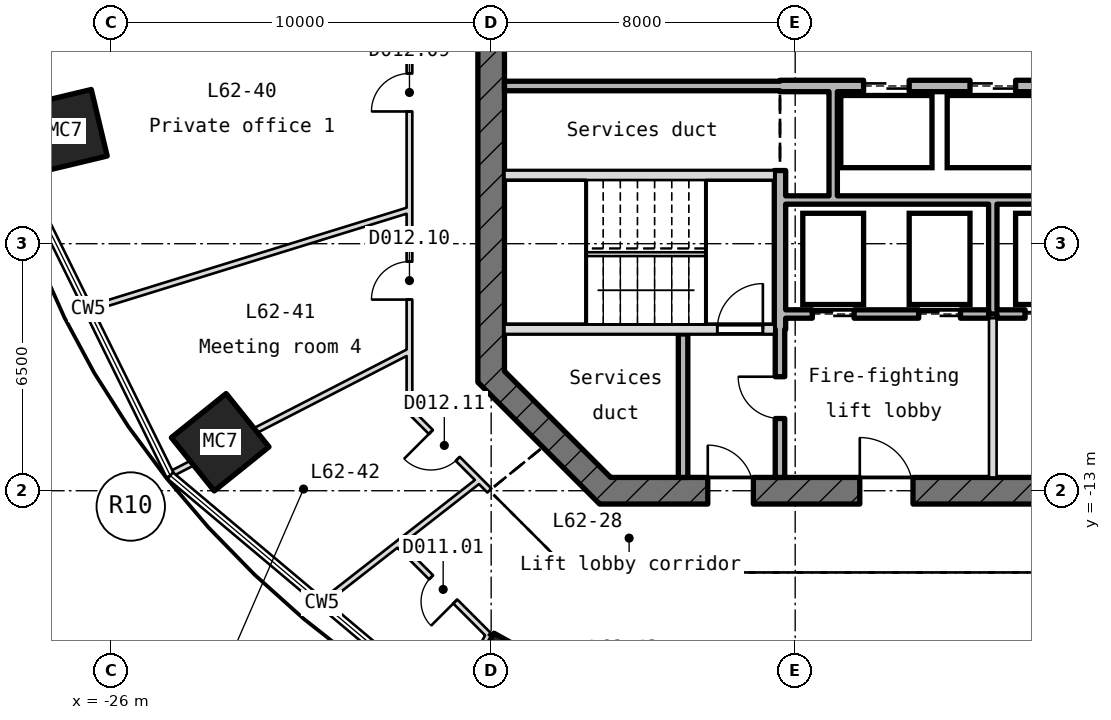
"""IFC4 building model, lengths in metres.
Left out: names, types, materials, properties, quantities, classifications, styles, units other than length and angle.
Written with IfcOpenShell. Run it as: python <this file> out.ifc"""

import sys

from ifc_helpers import new_model, si_unit, direction, frame, frame_2d, origin, origin_2d, place, context, subcontext, project, spatial, rectangle, hollow_rectangle, extrude, element, fill, save


model = new_model("IFC4")
c1 = context("Model", 3, precision=1e-05, world=origin(), true_north=direction((0.0, 1.0)))
c2 = subcontext(c1, "Body", "Model", "MODEL_VIEW")
j1 = project(units=[si_unit("LENGTHUNIT", "METRE"), si_unit("PLANEANGLEUNIT", "RADIAN")], contexts=[c1])
p1 = place(None, origin())
s1 = spatial("IfcSite", under=j1, at=p1, CompositionType="ELEMENT")
p2 = place(p1, origin())
s2 = spatial("IfcBuilding", under=s1, at=p2, CompositionType="ELEMENT")
p3 = place(p2, frame((0.0, 0.0, 279.1)))
s3 = spatial("IfcBuildingStorey", under=s2, at=p3, CompositionType="ELEMENT", Elevation=279.1)
for number, where, z_axis, x_axis in (
    (1, (-27.213, -3.533, -0.25), (0.0, 0.0, 1.0), (-0.233, 0.973, 0.0)),
    (2, (-23.131, -11.724, -0.25), (0.0, 0.0, 1.0), (-0.627, 0.779, 0.0)),
    (3, (-15.588, -17.993, -0.25), (0.0, 0.0, 1.0), (-0.874, 0.486, 0.0)),
):
    element("IfcColumn", number, at=place(p3, frame(where, z_axis=z_axis, x_axis=x_axis)), inside=s3, PredefinedType="COLUMN", context=c2, shape_type="SweptSolid", body=[
        extrude(hollow_rectangle(XDim=1.8, YDim=1.85, WallThickness=0.06, at=origin_2d()), origin(), (0.0, 0.0, 1.0), 5.47),
    ])
p4 = place(p3, frame((-16.0, 10.145, -0.25), z_axis=(0.0, 0.0, 1.0), x_axis=(0.0, -1.0, 0.0)))
e4 = element("IfcWall", 4, at=p4, inside=s3, PredefinedType="SHEAR", context=c2, shape_type="SweptSolid", body=[
    extrude(rectangle(XDim=20.29, YDim=0.7, at=frame_2d((10.145, 0.0))), origin(), (0.0, 0.0, 1.0), 5.47),
])
p5 = place(p4, frame((8.945, 0.0, 0.25)))
e5 = element("IfcOpeningElement", 5, at=p5, cuts=e4, PredefinedType="OPENING", context=c2, shape_type="SweptSolid", body=[
    extrude(rectangle(XDim=2.4, YDim=2.1, at=frame_2d((1.2, 1.05))), frame((0.0, 0.36, 0.0), z_axis=(0.0, -1.0, 0.0), x_axis=(1.0, 0.0, 0.0)), (0.0, 0.0, 1.0), 0.72),
])
p6 = place(p4, frame((5.545, 0.0, 0.25)))
e6 = element("IfcOpeningElement", 6, at=p6, cuts=e4, PredefinedType="OPENING", context=c2, shape_type="SweptSolid", body=[
    extrude(rectangle(XDim=1.2, YDim=2.1, at=frame_2d((0.6, 1.05))), frame((0.0, 0.36, 0.0), z_axis=(0.0, -1.0, 0.0), x_axis=(1.0, 0.0, 0.0)), (0.0, 0.0, 1.0), 0.72),
])
p7 = place(p3, frame((-16.103, -9.897, -0.25), z_axis=(0.0, 0.0, 1.0), x_axis=(0.707106781187, -0.707106781187, 0.0)))
e7 = element("IfcWall", 7, at=p7, inside=s3, PredefinedType="SHEAR", context=c2, shape_type="SweptSolid", body=[
    extrude(rectangle(XDim=4.533, YDim=0.7, at=frame_2d((2.266, 0.0))), origin(), (0.0, 0.0, 1.0), 5.47),
])
p8 = place(p3, frame((-13.145, -13.0, -0.25), z_axis=(0.0, 0.0, 1.0), x_axis=(1.0, 0.0, 0.0)))
e8 = element("IfcWall", 8, at=p8, inside=s3, PredefinedType="SHEAR", context=c2, shape_type="SweptSolid", body=[
    extrude(rectangle(XDim=26.29, YDim=0.7, at=frame_2d((13.145, 0.0))), origin(), (0.0, 0.0, 1.0), 5.47),
])
p9 = place(p8, frame((2.845, 0.0, 0.25)))
e9 = element("IfcOpeningElement", 9, at=p9, cuts=e8, PredefinedType="OPENING", context=c2, shape_type="SweptSolid", body=[
    extrude(rectangle(XDim=1.2, YDim=2.1, at=frame_2d((0.6, 1.05))), frame((0.0, 0.36, 0.0), z_axis=(0.0, -1.0, 0.0), x_axis=(1.0, 0.0, 0.0)), (0.0, 0.0, 1.0), 0.72),
])
p10 = place(p8, frame((6.845, 0.0, 0.25)))
e10 = element("IfcOpeningElement", 10, at=p10, cuts=e8, PredefinedType="OPENING", context=c2, shape_type="SweptSolid", body=[
    extrude(rectangle(XDim=1.4, YDim=2.1, at=frame_2d((0.7, 1.05))), frame((0.0, 0.36, 0.0), z_axis=(0.0, -1.0, 0.0), x_axis=(1.0, 0.0, 0.0)), (0.0, 0.0, 1.0), 0.72),
])
p11 = place(p8, frame((15.445, 0.0, 0.25)))
e11 = element("IfcOpeningElement", 11, at=p11, cuts=e8, PredefinedType="OPENING", context=c2, shape_type="SweptSolid", body=[
    extrude(rectangle(XDim=1.4, YDim=2.1, at=frame_2d((0.7, 1.05))), frame((0.0, 0.36, 0.0), z_axis=(0.0, -1.0, 0.0), x_axis=(1.0, 0.0, 0.0)), (0.0, 0.0, 1.0), 0.72),
])
p12 = place(p3, frame((-15.65, -8.75, -0.25), z_axis=(0.0, 0.0, 1.0), x_axis=(1.0, 0.0, 0.0)))
e12 = element("IfcWall", 12, at=p12, inside=s3, PredefinedType="SHEAR", context=c2, shape_type="SweptSolid", body=[
    extrude(rectangle(XDim=7.1, YDim=0.25, at=frame_2d((3.55, 0.0))), origin(), (0.0, 0.0, 1.0), 5.47),
])
p13 = place(p12, frame((5.6, 0.0, 0.25)))
e13 = element("IfcOpeningElement", 13, at=p13, cuts=e12, PredefinedType="OPENING", context=c2, shape_type="SweptSolid", body=[
    extrude(rectangle(XDim=1.2, YDim=2.1, at=frame_2d((0.6, 1.05))), frame((0.0, 0.135, 0.0), z_axis=(0.0, -1.0, 0.0), x_axis=(1.0, 0.0, 0.0)), (0.0, 0.0, 1.0), 0.27),
])
p14 = place(p3, frame((-8.25, -8.35, 0.0), z_axis=(0.0, 0.0, 1.0), x_axis=(1.0, 0.0, 0.0)))
e14 = element("IfcWall", 14, at=p14, inside=s3, PredefinedType="STANDARD", context=c2, shape_type="SweptSolid", body=[
    extrude(rectangle(XDim=5.34, YDim=0.22, at=frame_2d((2.67, 0.0))), origin(), (0.0, 0.0, 1.0), 5.22),
])
p15 = place(p14, frame((0.7, 0.0, 0.0)))
e15 = element("IfcOpeningElement", 15, at=p15, cuts=e14, PredefinedType="OPENING", context=c2, shape_type="SweptSolid", body=[
    extrude(rectangle(XDim=1.1, YDim=2.1, at=frame_2d((0.55, 1.05))), frame((0.0, 0.12, 0.0), z_axis=(0.0, -1.0, 0.0), x_axis=(1.0, 0.0, 0.0)), (0.0, 0.0, 1.0), 0.24),
])
p16 = place(p14, frame((3.5, 0.0, 0.0)))
e16 = element("IfcOpeningElement", 16, at=p16, cuts=e14, PredefinedType="OPENING", context=c2, shape_type="SweptSolid", body=[
    extrude(rectangle(XDim=1.1, YDim=2.1, at=frame_2d((0.55, 1.05))), frame((0.0, 0.12, 0.0), z_axis=(0.0, -1.0, 0.0), x_axis=(1.0, 0.0, 0.0)), (0.0, 0.0, 1.0), 0.24),
])
p17 = place(p3, frame((-2.69, -8.35, 0.0), z_axis=(0.0, 0.0, 1.0), x_axis=(1.0, 0.0, 0.0)))
e17 = element("IfcWall", 17, at=p17, inside=s3, PredefinedType="STANDARD", context=c2, shape_type="SweptSolid", body=[
    extrude(rectangle(XDim=10.94, YDim=0.22, at=frame_2d((5.47, 0.0))), origin(), (0.0, 0.0, 1.0), 5.22),
])
p18 = place(p17, frame((0.74, 0.0, 0.0)))
e18 = element("IfcOpeningElement", 18, at=p18, cuts=e17, PredefinedType="OPENING", context=c2, shape_type="SweptSolid", body=[
    extrude(rectangle(XDim=1.1, YDim=2.1, at=frame_2d((0.55, 1.05))), frame((0.0, 0.12, 0.0), z_axis=(0.0, -1.0, 0.0), x_axis=(1.0, 0.0, 0.0)), (0.0, 0.0, 1.0), 0.24),
])
p19 = place(p17, frame((3.54, 0.0, 0.0)))
e19 = element("IfcOpeningElement", 19, at=p19, cuts=e17, PredefinedType="OPENING", context=c2, shape_type="SweptSolid", body=[
    extrude(rectangle(XDim=1.1, YDim=2.1, at=frame_2d((0.55, 1.05))), frame((0.0, 0.12, 0.0), z_axis=(0.0, -1.0, 0.0), x_axis=(1.0, 0.0, 0.0)), (0.0, 0.0, 1.0), 0.24),
])
p20 = place(p3, frame((-8.25, -5.35, 0.0), z_axis=(0.0, 0.0, 1.0), x_axis=(1.0, 0.0, 0.0)))
e20 = element("IfcWall", 20, at=p20, inside=s3, PredefinedType="STANDARD", context=c2, shape_type="SweptSolid", body=[
    extrude(rectangle(XDim=16.5, YDim=0.22, at=frame_2d((8.25, 0.0))), origin(), (0.0, 0.0, 1.0), 5.22),
])
p21 = place(p3, frame((-15.65, -4.7, -0.25), z_axis=(0.0, 0.0, 1.0), x_axis=(1.0, 0.0, 0.0)))
e21 = element("IfcWall", 21, at=p21, inside=s3, PredefinedType="SHEAR", context=c2, shape_type="SweptSolid", body=[
    extrude(rectangle(XDim=7.1, YDim=0.25, at=frame_2d((3.55, 0.0))), origin(), (0.0, 0.0, 1.0), 5.47),
])
p22 = place(p3, frame((-15.65, -2.35, 0.0), z_axis=(0.0, 0.0, 1.0), x_axis=(1.0, 0.0, 0.0)))
e22 = element("IfcWall", 22, at=p22, inside=s3, PredefinedType="STANDARD", context=c2, shape_type="SweptSolid", body=[
    extrude(rectangle(XDim=7.25, YDim=0.25, at=frame_2d((3.625, 0.0))), origin(), (0.0, 0.0, 1.0), 5.22),
])
p23 = place(p3, frame((-8.4, -2.35, -0.25), z_axis=(0.0, 0.0, 1.0), x_axis=(1.0, 0.0, 0.0)))
e23 = element("IfcWall", 23, at=p23, inside=s3, PredefinedType="SHEAR", context=c2, shape_type="SweptSolid", body=[
    extrude(rectangle(XDim=16.8, YDim=0.3, at=frame_2d((8.4, 0.0))), origin(), (0.0, 0.0, 1.0), 5.47),
])
p24 = place(p23, frame((2.2, 0.0, 0.25)))
e24 = element("IfcOpeningElement", 24, at=p24, cuts=e23, PredefinedType="OPENING", context=c2, shape_type="SweptSolid", body=[
    extrude(rectangle(XDim=1.2, YDim=2.1, at=frame_2d((0.6, 1.05))), frame((0.0, 0.16, 0.0), z_axis=(0.0, -1.0, 0.0), x_axis=(1.0, 0.0, 0.0)), (0.0, 0.0, 1.0), 0.32),
])
p25 = place(p23, frame((5.0, 0.0, 0.25)))
e25 = element("IfcOpeningElement", 25, at=p25, cuts=e23, PredefinedType="OPENING", context=c2, shape_type="SweptSolid", body=[
    extrude(rectangle(XDim=1.2, YDim=2.1, at=frame_2d((0.6, 1.05))), frame((0.0, 0.16, 0.0), z_axis=(0.0, -1.0, 0.0), x_axis=(1.0, 0.0, 0.0)), (0.0, 0.0, 1.0), 0.32),
])
p26 = place(p23, frame((7.8, 0.0, 0.25)))
e26 = element("IfcOpeningElement", 26, at=p26, cuts=e23, PredefinedType="OPENING", context=c2, shape_type="SweptSolid", body=[
    extrude(rectangle(XDim=1.2, YDim=2.1, at=frame_2d((0.6, 1.05))), frame((0.0, 0.16, 0.0), z_axis=(0.0, -1.0, 0.0), x_axis=(1.0, 0.0, 0.0)), (0.0, 0.0, 1.0), 0.32),
])
p27 = place(p23, frame((10.6, 0.0, 0.25)))
e27 = element("IfcOpeningElement", 27, at=p27, cuts=e23, PredefinedType="OPENING", context=c2, shape_type="SweptSolid", body=[
    extrude(rectangle(XDim=1.2, YDim=2.1, at=frame_2d((0.6, 1.05))), frame((0.0, 0.16, 0.0), z_axis=(0.0, -1.0, 0.0), x_axis=(1.0, 0.0, 0.0)), (0.0, 0.0, 1.0), 0.32),
])
p28 = place(p23, frame((13.4, 0.0, 0.25)))
e28 = element("IfcOpeningElement", 28, at=p28, cuts=e23, PredefinedType="OPENING", context=c2, shape_type="SweptSolid", body=[
    extrude(rectangle(XDim=1.2, YDim=2.1, at=frame_2d((0.6, 1.05))), frame((0.0, 0.16, 0.0), z_axis=(0.0, -1.0, 0.0), x_axis=(1.0, 0.0, 0.0)), (0.0, 0.0, 1.0), 0.32),
])
p29 = place(p3, frame((-10.95, -12.65, 0.0), z_axis=(0.0, 0.0, 1.0), x_axis=(0.0, 1.0, 0.0)))
e29 = element("IfcWall", 29, at=p29, inside=s3, PredefinedType="STANDARD", context=c2, shape_type="SweptSolid", body=[
    extrude(rectangle(XDim=3.775, YDim=0.25, at=frame_2d((1.887, 0.0))), origin(), (0.0, 0.0, 1.0), 5.22),
])
p30 = place(p3, frame((-8.4, -12.65, 0.0), z_axis=(0.0, 0.0, 1.0), x_axis=(0.0, 1.0, 0.0)))
e30 = element("IfcWall", 30, at=p30, inside=s3, PredefinedType="STANDARD", context=c2, shape_type="SweptSolid", body=[
    extrude(rectangle(XDim=3.9, YDim=0.25, at=frame_2d((1.95, 0.0))), origin(), (0.0, 0.0, 1.0), 5.22),
])
p31 = place(p30, frame((1.55, 0.0, 0.0)))
e31 = element("IfcOpeningElement", 31, at=p31, cuts=e30, PredefinedType="OPENING", context=c2, shape_type="SweptSolid", body=[
    extrude(rectangle(XDim=1.1, YDim=2.1, at=frame_2d((0.55, 1.05))), frame((0.0, 0.135, 0.0), z_axis=(0.0, -1.0, 0.0), x_axis=(1.0, 0.0, 0.0)), (0.0, 0.0, 1.0), 0.27),
])
p32 = place(p3, frame((-8.4, -8.75, -0.25), z_axis=(0.0, 0.0, 1.0), x_axis=(0.0, 1.0, 0.0)))
e32 = element("IfcWall", 32, at=p32, inside=s3, PredefinedType="SHEAR", context=c2, shape_type="SweptSolid", body=[
    extrude(rectangle(XDim=4.175, YDim=0.3, at=frame_2d((2.087, 0.0))), origin(), (0.0, 0.0, 1.0), 5.47),
])
p33 = place(p3, frame((-7.0, -5.24, 0.0), z_axis=(0.0, 0.0, 1.0), x_axis=(0.0, 1.0, 0.0)))
e33 = element("IfcWall", 33, at=p33, inside=s3, PredefinedType="STANDARD", context=c2, shape_type="SweptSolid", body=[
    extrude(rectangle(XDim=2.74, YDim=0.22, at=frame_2d((1.37, 0.0))), origin(), (0.0, 0.0, 1.0), 5.22),
])
p34 = place(p3, frame((-2.8, -12.65, 0.0), z_axis=(0.0, 0.0, 1.0), x_axis=(0.0, 1.0, 0.0)))
e34 = element("IfcWall", 34, at=p34, inside=s3, PredefinedType="PARTITIONING", context=c2, shape_type="SweptSolid", body=[
    extrude(rectangle(XDim=4.19, YDim=0.2, at=frame_2d((2.095, 0.0))), origin(), (0.0, 0.0, 1.0), 5.22),
])
p35 = place(p3, frame((-2.8, -8.35, 0.0), z_axis=(0.0, 0.0, 1.0), x_axis=(0.0, 1.0, 0.0)))
e35 = element("IfcWall", 35, at=p35, inside=s3, PredefinedType="STANDARD", context=c2, shape_type="SweptSolid", body=[
    extrude(rectangle(XDim=2.89, YDim=0.22, at=frame_2d((1.445, 0.0))), origin(), (0.0, 0.0, 1.0), 5.22),
])
p36 = place(p3, frame((-26.584, -8.216, 0.0), z_axis=(0.0, 0.0, 1.0), x_axis=(0.955409308592, 0.29528469831, 0.0)))
e36 = element("IfcWall", 36, at=p36, inside=s3, PredefinedType="PARTITIONING", context=c2, shape_type="SweptSolid", body=[
    extrude(rectangle(XDim=8.828, YDim=0.15, at=frame_2d((4.414, 0.0))), origin(), (0.0, 0.0, 1.0), 5.22),
])
p37 = place(p3, frame((-24.44, -12.566, 0.0), z_axis=(0.0, 0.0, 1.0), x_axis=(0.889344754937, 0.45723725446, 0.0)))
e37 = element("IfcWall", 37, at=p37, inside=s3, PredefinedType="PARTITIONING", context=c2, shape_type="SweptSolid", body=[
    extrude(rectangle(XDim=7.073, YDim=0.15, at=frame_2d((3.536, 0.0))), origin(), (0.0, 0.0, 1.0), 5.22),
])
p38 = place(p3, frame((-18.46, -14.399, 0.0), z_axis=(0.0, 0.0, 1.0), x_axis=(0.788462265821, 0.615083128834, 0.0)))
e38 = element("IfcWall", 38, at=p38, inside=s3, PredefinedType="PARTITIONING", context=c2, shape_type="SweptSolid", body=[
    extrude(rectangle(XDim=2.72, YDim=0.15, at=frame_2d((1.36, 0.0))), origin(), (0.0, 0.0, 1.0), 5.22),
])
p39 = place(p3, frame((-18.15, -10.891, 0.0), z_axis=(0.0, 0.0, 1.0), x_axis=(0.0, 1.0, 0.0)))
e39 = element("IfcWall", 39, at=p39, inside=s3, PredefinedType="PARTITIONING", context=c2, shape_type="SweptSolid", body=[
    extrude(rectangle(XDim=21.614, YDim=0.15, at=frame_2d((10.807, 0.0))), origin(), (0.0, 0.0, 1.0), 5.22),
])
p40 = place(p39, frame((14.093, 0.0, 0.0)))
e40 = element("IfcOpeningElement", 40, at=p40, cuts=e39, PredefinedType="OPENING", context=c2, shape_type="SweptSolid", body=[
    extrude(rectangle(XDim=1.0, YDim=2.1, at=frame_2d((0.5, 1.05))), frame((0.0, 0.085, 0.0), z_axis=(0.0, -1.0, 0.0), x_axis=(1.0, 0.0, 0.0)), (0.0, 0.0, 1.0), 0.17),
])
p41 = place(p39, frame((7.87, 0.0, 0.0)))
e41 = element("IfcOpeningElement", 41, at=p41, cuts=e39, PredefinedType="OPENING", context=c2, shape_type="SweptSolid", body=[
    extrude(rectangle(XDim=1.0, YDim=2.1, at=frame_2d((0.5, 1.05))), frame((0.0, 0.085, 0.0), z_axis=(0.0, -1.0, 0.0), x_axis=(1.0, 0.0, 0.0)), (0.0, 0.0, 1.0), 0.17),
])
p42 = place(p39, frame((2.92, 0.0, 0.0)))
e42 = element("IfcOpeningElement", 42, at=p42, cuts=e39, PredefinedType="OPENING", context=c2, shape_type="SweptSolid", body=[
    extrude(rectangle(XDim=1.0, YDim=2.1, at=frame_2d((0.5, 1.05))), frame((0.0, 0.085, 0.0), z_axis=(0.0, -1.0, 0.0), x_axis=(1.0, 0.0, 0.0)), (0.0, 0.0, 1.0), 0.17),
])
p43 = place(p3, frame((-16.046, -12.994, 0.0), z_axis=(0.0, 0.0, 1.0), x_axis=(-0.707106781187, 0.707106781187, 0.0)))
e43 = element("IfcWall", 43, at=p43, inside=s3, PredefinedType="PARTITIONING", context=c2, shape_type="SweptSolid", body=[
    extrude(rectangle(XDim=2.975, YDim=0.15, at=frame_2d((1.487, 0.0))), origin(), (0.0, 0.0, 1.0), 5.22),
])
p44 = place(p43, frame((1.177, 0.0, 0.0)))
e44 = element("IfcOpeningElement", 44, at=p44, cuts=e43, PredefinedType="OPENING", context=c2, shape_type="SweptSolid", body=[
    extrude(rectangle(XDim=1.0, YDim=2.1, at=frame_2d((0.5, 1.05))), frame((0.0, 0.085, 0.0), z_axis=(0.0, -1.0, 0.0), x_axis=(1.0, 0.0, 0.0)), (0.0, 0.0, 1.0), 0.17),
])
p45 = place(p3, frame((-20.439, -15.942, 0.0), z_axis=(0.0, 0.0, 1.0), x_axis=(0.788556920003, 0.614961774353, 0.0)))
e45 = element("IfcWall", 45, at=p45, inside=s3, PredefinedType="PARTITIONING", context=c2, shape_type="SweptSolid", body=[
    extrude(rectangle(XDim=2.515, YDim=0.15, at=frame_2d((1.257, 0.0))), origin(), (0.0, 0.0, 1.0), 5.22),
])
p46 = place(p3, frame((-16.96, -18.404, 0.0), z_axis=(0.0, 0.0, 1.0), x_axis=(0.48554166506, 0.874213527401, 0.0)))
e46 = element("IfcWall", 46, at=p46, inside=s3, PredefinedType="PARTITIONING", context=c2, shape_type="SweptSolid", body=[
    extrude(rectangle(XDim=1.842, YDim=0.15, at=frame_2d((0.921, 0.0))), origin(), (0.0, 0.0, 1.0), 5.22),
])
p47 = place(p3, frame((-16.066, -16.793, 0.0), z_axis=(0.0, 0.0, 1.0), x_axis=(-0.707070734655, 0.70714282588, 0.0)))
e47 = element("IfcWall", 47, at=p47, inside=s3, PredefinedType="PARTITIONING", context=c2, shape_type="SweptSolid", body=[
    extrude(rectangle(XDim=3.386, YDim=0.15, at=frame_2d((1.693, 0.0))), origin(), (0.0, 0.0, 1.0), 5.22),
])
p48 = place(p47, frame((1.243, 0.0, 0.0)))
e48 = element("IfcOpeningElement", 48, at=p48, cuts=e47, PredefinedType="OPENING", context=c2, shape_type="SweptSolid", body=[
    extrude(rectangle(XDim=0.9, YDim=2.1, at=frame_2d((0.45, 1.05))), frame((0.0, 0.085, 0.0), z_axis=(0.0, -1.0, 0.0), x_axis=(1.0, 0.0, 0.0)), (0.0, 0.0, 1.0), 0.17),
])
p49 = place(p24, origin())
e49 = element("IfcDoor", 49, at=p49, inside=s3, OperationType="DOUBLE_DOOR_SLIDING", PredefinedType="DOOR", context=c2, shape_type="SweptSolid", body=[
    extrude(rectangle(XDim=1.2, YDim=2.1, at=frame_2d((0.6, 1.05))), frame((0.0, 0.025, 0.0), z_axis=(0.0, -1.0, 0.0), x_axis=(1.0, 0.0, 0.0)), (0.0, 0.0, 1.0), 0.05),
])
fill(e24, e49)
p50 = place(p25, origin())
e50 = element("IfcDoor", 50, at=p50, inside=s3, OperationType="DOUBLE_DOOR_SLIDING", PredefinedType="DOOR", context=c2, shape_type="SweptSolid", body=[
    extrude(rectangle(XDim=1.2, YDim=2.1, at=frame_2d((0.6, 1.05))), frame((0.0, 0.025, 0.0), z_axis=(0.0, -1.0, 0.0), x_axis=(1.0, 0.0, 0.0)), (0.0, 0.0, 1.0), 0.05),
])
fill(e25, e50)
p51 = place(p15, origin())
e51 = element("IfcDoor", 51, at=p51, inside=s3, OperationType="DOUBLE_DOOR_SLIDING", PredefinedType="DOOR", context=c2, shape_type="SweptSolid", body=[
    extrude(rectangle(XDim=1.1, YDim=2.1, at=frame_2d((0.55, 1.05))), frame((0.0, 0.025, 0.0), z_axis=(0.0, -1.0, 0.0), x_axis=(1.0, 0.0, 0.0)), (0.0, 0.0, 1.0), 0.05),
])
fill(e15, e51)
p52 = place(p16, origin())
e52 = element("IfcDoor", 52, at=p52, inside=s3, OperationType="DOUBLE_DOOR_SLIDING", PredefinedType="DOOR", context=c2, shape_type="SweptSolid", body=[
    extrude(rectangle(XDim=1.1, YDim=2.1, at=frame_2d((0.55, 1.05))), frame((0.0, 0.025, 0.0), z_axis=(0.0, -1.0, 0.0), x_axis=(1.0, 0.0, 0.0)), (0.0, 0.0, 1.0), 0.05),
])
fill(e16, e52)
p53 = place(p18, origin())
e53 = element("IfcDoor", 53, at=p53, inside=s3, OperationType="DOUBLE_DOOR_SLIDING", PredefinedType="DOOR", context=c2, shape_type="SweptSolid", body=[
    extrude(rectangle(XDim=1.1, YDim=2.1, at=frame_2d((0.55, 1.05))), frame((0.0, 0.025, 0.0), z_axis=(0.0, -1.0, 0.0), x_axis=(1.0, 0.0, 0.0)), (0.0, 0.0, 1.0), 0.05),
])
fill(e18, e53)
p54 = place(p13, origin())
e54 = element("IfcDoor", 54, at=p54, inside=s3, OperationType="SINGLE_SWING_RIGHT", PredefinedType="DOOR", context=c2, shape_type="SweptSolid", body=[
    extrude(rectangle(XDim=1.2, YDim=2.1, at=frame_2d((0.6, 1.05))), frame((0.0, 0.025, 0.0), z_axis=(0.0, -1.0, 0.0), x_axis=(1.0, 0.0, 0.0)), (0.0, 0.0, 1.0), 0.05),
])
fill(e13, e54)
p55 = place(p31, origin())
e55 = element("IfcDoor", 55, at=p55, inside=s3, OperationType="SINGLE_SWING_RIGHT", PredefinedType="DOOR", context=c2, shape_type="SweptSolid", body=[
    extrude(rectangle(XDim=1.1, YDim=2.1, at=frame_2d((0.55, 1.05))), frame((0.0, 0.025, 0.0), z_axis=(0.0, -1.0, 0.0), x_axis=(1.0, 0.0, 0.0)), (0.0, 0.0, 1.0), 0.05),
])
fill(e31, e55)
p56 = place(p9, origin())
e56 = element("IfcDoor", 56, at=p56, inside=s3, OperationType="SINGLE_SWING_RIGHT", PredefinedType="DOOR", context=c2, shape_type="SweptSolid", body=[
    extrude(rectangle(XDim=1.2, YDim=2.1, at=frame_2d((0.6, 1.05))), frame((0.0, 0.025, 0.0), z_axis=(0.0, -1.0, 0.0), x_axis=(1.0, 0.0, 0.0)), (0.0, 0.0, 1.0), 0.05),
])
fill(e9, e56)
p57 = place(p10, origin())
e57 = element("IfcDoor", 57, at=p57, inside=s3, OperationType="SINGLE_SWING_RIGHT", PredefinedType="DOOR", context=c2, shape_type="SweptSolid", body=[
    extrude(rectangle(XDim=1.4, YDim=2.1, at=frame_2d((0.7, 1.05))), frame((0.0, 0.025, 0.0), z_axis=(0.0, -1.0, 0.0), x_axis=(1.0, 0.0, 0.0)), (0.0, 0.0, 1.0), 0.05),
])
fill(e10, e57)
p58 = place(p41, origin())
e58 = element("IfcDoor", 58, at=p58, inside=s3, OperationType="SINGLE_SWING_RIGHT", PredefinedType="DOOR", context=c2, shape_type="SweptSolid", body=[
    extrude(rectangle(XDim=1.0, YDim=2.1, at=frame_2d((0.5, 1.05))), frame((0.0, 0.025, 0.0), z_axis=(0.0, -1.0, 0.0), x_axis=(1.0, 0.0, 0.0)), (0.0, 0.0, 1.0), 0.05),
])
fill(e41, e58)
p59 = place(p42, origin())
e59 = element("IfcDoor", 59, at=p59, inside=s3, OperationType="SINGLE_SWING_RIGHT", PredefinedType="DOOR", context=c2, shape_type="SweptSolid", body=[
    extrude(rectangle(XDim=1.0, YDim=2.1, at=frame_2d((0.5, 1.05))), frame((0.0, 0.025, 0.0), z_axis=(0.0, -1.0, 0.0), x_axis=(1.0, 0.0, 0.0)), (0.0, 0.0, 1.0), 0.05),
])
fill(e42, e59)
p60 = place(p44, origin())
e60 = element("IfcDoor", 60, at=p60, inside=s3, OperationType="SINGLE_SWING_RIGHT", PredefinedType="DOOR", context=c2, shape_type="SweptSolid", body=[
    extrude(rectangle(XDim=1.0, YDim=2.1, at=frame_2d((0.5, 1.05))), frame((0.0, 0.025, 0.0), z_axis=(0.0, -1.0, 0.0), x_axis=(1.0, 0.0, 0.0)), (0.0, 0.0, 1.0), 0.05),
])
fill(e44, e60)
p61 = place(p48, origin())
e61 = element("IfcDoor", 61, at=p61, inside=s3, OperationType="SINGLE_SWING_RIGHT", PredefinedType="DOOR", context=c2, shape_type="SweptSolid", body=[
    extrude(rectangle(XDim=0.9, YDim=2.1, at=frame_2d((0.45, 1.05))), frame((0.0, 0.025, 0.0), z_axis=(0.0, -1.0, 0.0), x_axis=(1.0, 0.0, 0.0)), (0.0, 0.0, 1.0), 0.05),
])
fill(e48, e61)
save(model, sys.argv[1])
